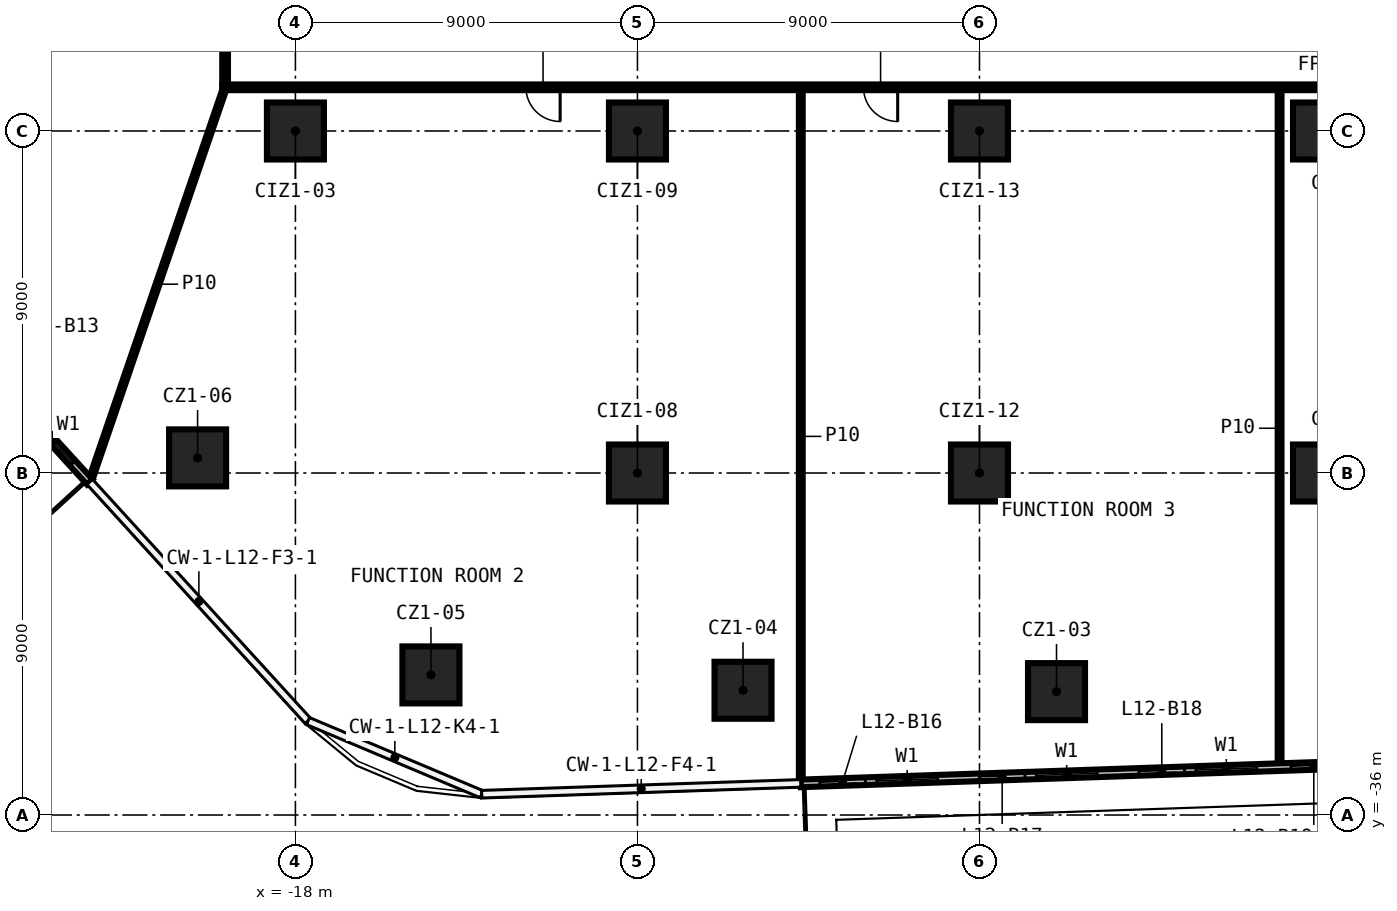
"""IFC4 building model, lengths in metres.
Left out: names, types, materials, properties, quantities, classifications, styles, units other than length and angle.
Written with IfcOpenShell. Run it as: python <this file> out.ifc"""

import sys

from ifc_helpers import new_model, si_unit, direction, frame, frame_2d, origin, origin_2d, place, context, subcontext, project, spatial, rectangle, extrude, element, fill, save


model = new_model("IFC4")
c1 = context("Model", 3, precision=1e-05, world=origin(), true_north=direction((0.0, 1.0)))
c2 = subcontext(c1, "Body", "Model", "MODEL_VIEW")
j1 = project(units=[si_unit("LENGTHUNIT", "METRE"), si_unit("PLANEANGLEUNIT", "RADIAN")], contexts=[c1])
p1 = place(None, origin())
s1 = spatial("IfcSite", under=j1, at=p1, CompositionType="ELEMENT")
p2 = place(p1, origin())
s2 = spatial("IfcBuilding", under=s1, at=p2, CompositionType="ELEMENT")
p3 = place(p2, frame((0.0, 0.0, 66.2)))
s3 = spatial("IfcBuildingStorey", under=s2, at=p3, CompositionType="ELEMENT", Elevation=66.2)
for number, where, z_axis, x_axis in (
    (1, (2.027, -32.753, 0.0), (0.0, 0.0, 1.0), (1.0, 0.0, 0.0)),
    (2, (-6.222, -32.717, 0.0), (0.0, 0.0, 1.0), (1.0, 0.0, 0.0)),
    (3, (-14.434, -32.313, 0.0), (0.0, 0.0, 1.0), (1.0, 0.0, 0.0)),
    (4, (-20.574, -26.602, 0.0), (0.0, 0.0, 1.0), (1.0, 0.0, 0.0)),
    (5, (-18.0, -18.0, 0.0), (0.0, 0.0, 1.0), (1.0, 0.0, 0.0)),
    (6, (-9.0, -27.0, 0.0), (0.0, 0.0, 1.0), (1.0, 0.0, 0.0)),
    (7, (-9.0, -18.0, 0.0), (0.0, 0.0, 1.0), (1.0, 0.0, 0.0)),
    (8, (0.0, -27.0, 0.0), (0.0, 0.0, 1.0), (1.0, 0.0, 0.0)),
    (9, (0.0, -18.0, 0.0), (0.0, 0.0, 1.0), (1.0, 0.0, 0.0)),
    (10, (9.0, -27.0, 0.0), (0.0, 0.0, 1.0), (1.0, 0.0, 0.0)),
    (11, (9.0, -18.0, 0.0), (0.0, 0.0, 1.0), (1.0, 0.0, 0.0)),
):
    element("IfcColumn", number, at=place(p3, frame(where, z_axis=z_axis, x_axis=x_axis)), inside=s3, PredefinedType="COLUMN", context=c2, shape_type="SweptSolid", body=[
        extrude(rectangle(XDim=1.5, YDim=1.5, at=origin_2d()), origin(), (0.0, 0.0, 1.0), 3.3),
    ])
p4 = place(p3, frame((19.925, -16.85, 0.0), z_axis=(0.0, 0.0, 1.0), x_axis=(-1.0, 0.0, 0.0)))
e12 = element("IfcWall", 12, at=p4, inside=s3, PredefinedType="PARTITIONING", context=c2, shape_type="SweptSolid", body=[
    extrude(rectangle(XDim=39.85, YDim=0.15, at=frame_2d((19.925, 0.0))), origin(), (0.0, 0.0, 1.0), 3.3),
])
p5 = place(p4, frame((30.959, 0.0, 0.0)))
e13 = element("IfcOpeningElement", 13, at=p5, cuts=e12, PredefinedType="OPENING", context=c2, shape_type="SweptSolid", body=[
    extrude(rectangle(XDim=0.9, YDim=2.1, at=frame_2d((0.45, 1.05))), frame((0.0, 0.085, 0.0), z_axis=(0.0, -1.0, 0.0), x_axis=(1.0, 0.0, 0.0)), (0.0, 0.0, 1.0), 0.17),
])
p6 = place(p4, frame((22.077, 0.0, 0.0)))
e14 = element("IfcOpeningElement", 14, at=p6, cuts=e12, PredefinedType="OPENING", context=c2, shape_type="SweptSolid", body=[
    extrude(rectangle(XDim=0.9, YDim=2.1, at=frame_2d((0.45, 1.05))), frame((0.0, 0.085, 0.0), z_axis=(0.0, -1.0, 0.0), x_axis=(1.0, 0.0, 0.0)), (0.0, 0.0, 1.0), 0.17),
])
p7 = place(p3, frame((-23.404, -27.213, 0.0), z_axis=(0.0, 0.0, 1.0), x_axis=(0.32441263541, 0.945915663253, 0.0)))
e15 = element("IfcWall", 15, at=p7, inside=s3, PredefinedType="PARTITIONING", context=c2, shape_type="SweptSolid", body=[
    extrude(rectangle(XDim=10.955, YDim=0.1, at=frame_2d((5.478, 0.0))), origin(), (0.0, 0.0, 1.0), 3.3),
])
p8 = place(p3, frame((7.897, -34.72, 0.0), z_axis=(0.0, 0.0, 1.0), x_axis=(0.0, 1.0, 0.0)))
e16 = element("IfcWall", 16, at=p8, inside=s3, PredefinedType="PARTITIONING", context=c2, shape_type="SweptSolid", body=[
    extrude(rectangle(XDim=17.795, YDim=0.1, at=frame_2d((8.897, 0.0))), origin(), (0.0, 0.0, 1.0), 3.3),
])
p9 = place(p3, frame((-4.702, -35.148, 0.0), z_axis=(0.0, 0.0, 1.0), x_axis=(0.0, 1.0, 0.0)))
e17 = element("IfcWall", 17, at=p9, inside=s3, PredefinedType="PARTITIONING", context=c2, shape_type="SweptSolid", body=[
    extrude(rectangle(XDim=18.223, YDim=0.1, at=frame_2d((9.111, 0.0))), origin(), (0.0, 0.0, 1.0), 3.3),
])
p10 = place(p3, frame((-19.85, -16.775, 0.0), z_axis=(0.0, 0.0, 1.0), x_axis=(0.0, 1.0, 0.0)))
e18 = element("IfcWall", 18, at=p10, inside=s3, PredefinedType="PARTITIONING", context=c2, shape_type="SweptSolid", body=[
    extrude(rectangle(XDim=33.55, YDim=0.15, at=frame_2d((16.775, 0.0))), origin(), (0.0, 0.0, 1.0), 3.3),
])
p11 = place(p10, frame((10.123, 0.0, 0.0)))
e19 = element("IfcOpeningElement", 19, at=p11, cuts=e18, PredefinedType="OPENING", context=c2, shape_type="SweptSolid", body=[
    extrude(rectangle(XDim=1.0, YDim=2.1, at=frame_2d((0.5, 1.05))), frame((0.0, 0.085, 0.0), z_axis=(0.0, -1.0, 0.0), x_axis=(1.0, 0.0, 0.0)), (0.0, 0.0, 1.0), 0.17),
])
p12 = place(p10, frame((4.179, 0.0, 0.0)))
e20 = element("IfcOpeningElement", 20, at=p12, cuts=e18, PredefinedType="OPENING", context=c2, shape_type="SweptSolid", body=[
    extrude(rectangle(XDim=0.9, YDim=2.1, at=frame_2d((0.45, 1.05))), frame((0.0, 0.085, 0.0), z_axis=(0.0, -1.0, 0.0), x_axis=(1.0, 0.0, 0.0)), (0.0, 0.0, 1.0), 0.17),
])
p13 = place(p10, frame((27.651, 0.0, 0.0)))
e21 = element("IfcOpeningElement", 21, at=p13, cuts=e18, PredefinedType="OPENING", context=c2, shape_type="SweptSolid", body=[
    extrude(rectangle(XDim=1.0, YDim=2.1, at=frame_2d((0.5, 1.05))), frame((0.0, 0.085, 0.0), z_axis=(0.0, -1.0, 0.0), x_axis=(1.0, 0.0, 0.0)), (0.0, 0.0, 1.0), 0.17),
])
p14 = place(p10, frame((20.601, 0.0, 0.0)))
e22 = element("IfcOpeningElement", 22, at=p14, cuts=e18, PredefinedType="OPENING", context=c2, shape_type="SweptSolid", body=[
    extrude(rectangle(XDim=1.0, YDim=2.1, at=frame_2d((0.5, 1.05))), frame((0.0, 0.085, 0.0), z_axis=(0.0, -1.0, 0.0), x_axis=(1.0, 0.0, 0.0)), (0.0, 0.0, 1.0), 0.17),
])
p15 = place(p3, frame((-34.906, -14.636, 0.0), z_axis=(0.0, 0.0, 1.0), x_axis=(0.674011334321, -0.738721003632, 0.0)))
e23 = element("IfcWall", 23, at=p15, inside=s3, PredefinedType="SOLIDWALL", context=c2, shape_type="SweptSolid", body=[
    extrude(rectangle(XDim=17.053, YDim=0.2, at=frame_2d((8.527, 0.0))), origin(), (0.0, 0.0, 1.0), 3.3),
])
p16 = place(p15, frame((0.5, 0.0, 0.6)))
e24 = element("IfcOpeningElement", 24, at=p16, cuts=e23, PredefinedType="OPENING", context=c2, shape_type="SweptSolid", body=[
    extrude(rectangle(XDim=1.6, YDim=2.4, at=frame_2d((0.8, 1.2))), frame((0.0, 0.11, 0.0), z_axis=(0.0, -1.0, 0.0), x_axis=(1.0, 0.0, 0.0)), (0.0, 0.0, 1.0), 0.22),
])
p17 = place(p15, frame((2.4, 0.0, 0.0)))
e25 = element("IfcOpeningElement", 25, at=p17, cuts=e23, PredefinedType="OPENING", context=c2, shape_type="SweptSolid", body=[
    extrude(rectangle(XDim=1.2, YDim=2.4, at=frame_2d((0.6, 1.2))), frame((0.0, 0.11, 0.0), z_axis=(0.0, -1.0, 0.0), x_axis=(1.0, 0.0, 0.0)), (0.0, 0.0, 1.0), 0.22),
])
p18 = place(p15, frame((6.263, 0.0, 0.6)))
e26 = element("IfcOpeningElement", 26, at=p18, cuts=e23, PredefinedType="OPENING", context=c2, shape_type="SweptSolid", body=[
    extrude(rectangle(XDim=1.6, YDim=2.4, at=frame_2d((0.8, 1.2))), frame((0.0, 0.11, 0.0), z_axis=(0.0, -1.0, 0.0), x_axis=(1.0, 0.0, 0.0)), (0.0, 0.0, 1.0), 0.22),
])
p19 = place(p15, frame((4.763, 0.0, 0.0)))
e27 = element("IfcOpeningElement", 27, at=p19, cuts=e23, PredefinedType="OPENING", context=c2, shape_type="SweptSolid", body=[
    extrude(rectangle(XDim=1.2, YDim=2.4, at=frame_2d((0.6, 1.2))), frame((0.0, 0.11, 0.0), z_axis=(0.0, -1.0, 0.0), x_axis=(1.0, 0.0, 0.0)), (0.0, 0.0, 1.0), 0.22),
])
p20 = place(p15, frame((9.027, 0.0, 0.6)))
e28 = element("IfcOpeningElement", 28, at=p20, cuts=e23, PredefinedType="OPENING", context=c2, shape_type="SweptSolid", body=[
    extrude(rectangle(XDim=1.6, YDim=2.4, at=frame_2d((0.8, 1.2))), frame((0.0, 0.11, 0.0), z_axis=(0.0, -1.0, 0.0), x_axis=(1.0, 0.0, 0.0)), (0.0, 0.0, 1.0), 0.22),
])
p21 = place(p15, frame((10.927, 0.0, 0.0)))
e29 = element("IfcOpeningElement", 29, at=p21, cuts=e23, PredefinedType="OPENING", context=c2, shape_type="SweptSolid", body=[
    extrude(rectangle(XDim=1.2, YDim=2.4, at=frame_2d((0.6, 1.2))), frame((0.0, 0.11, 0.0), z_axis=(0.0, -1.0, 0.0), x_axis=(1.0, 0.0, 0.0)), (0.0, 0.0, 1.0), 0.22),
])
p22 = place(p15, frame((14.79, 0.0, 0.6)))
e30 = element("IfcOpeningElement", 30, at=p22, cuts=e23, PredefinedType="OPENING", context=c2, shape_type="SweptSolid", body=[
    extrude(rectangle(XDim=1.6, YDim=2.4, at=frame_2d((0.8, 1.2))), frame((0.0, 0.11, 0.0), z_axis=(0.0, -1.0, 0.0), x_axis=(1.0, 0.0, 0.0)), (0.0, 0.0, 1.0), 0.22),
])
p23 = place(p15, frame((13.29, 0.0, 0.0)))
e31 = element("IfcOpeningElement", 31, at=p23, cuts=e23, PredefinedType="OPENING", context=c2, shape_type="SweptSolid", body=[
    extrude(rectangle(XDim=1.2, YDim=2.4, at=frame_2d((0.6, 1.2))), frame((0.0, 0.11, 0.0), z_axis=(0.0, -1.0, 0.0), x_axis=(1.0, 0.0, 0.0)), (0.0, 0.0, 1.0), 0.22),
])
p24 = place(p3, frame((-4.702, -35.168, 0.0), z_axis=(0.0, 0.0, 1.0), x_axis=(0.999424265527, 0.033928416948, 0.0)))
e32 = element("IfcWall", 32, at=p24, inside=s3, PredefinedType="SOLIDWALL", context=c2, shape_type="SweptSolid", body=[
    extrude(rectangle(XDim=21.012, YDim=0.2, at=frame_2d((10.506, 0.0))), origin(), (0.0, 0.0, 1.0), 3.3),
])
p25 = place(p24, frame((2.0, 0.0, 0.6)))
e33 = element("IfcOpeningElement", 33, at=p25, cuts=e32, PredefinedType="OPENING", context=c2, shape_type="SweptSolid", body=[
    extrude(rectangle(XDim=1.6, YDim=2.4, at=frame_2d((0.8, 1.2))), frame((0.0, 0.11, 0.0), z_axis=(0.0, -1.0, 0.0), x_axis=(1.0, 0.0, 0.0)), (0.0, 0.0, 1.0), 0.22),
])
p26 = place(p24, frame((0.5, 0.0, 0.0)))
e34 = element("IfcOpeningElement", 34, at=p26, cuts=e32, PredefinedType="OPENING", context=c2, shape_type="SweptSolid", body=[
    extrude(rectangle(XDim=1.2, YDim=2.4, at=frame_2d((0.6, 1.2))), frame((0.0, 0.11, 0.0), z_axis=(0.0, -1.0, 0.0), x_axis=(1.0, 0.0, 0.0)), (0.0, 0.0, 1.0), 0.22),
])
p27 = place(p24, frame((6.202, 0.0, 0.6)))
e35 = element("IfcOpeningElement", 35, at=p27, cuts=e32, PredefinedType="OPENING", context=c2, shape_type="SweptSolid", body=[
    extrude(rectangle(XDim=1.6, YDim=2.4, at=frame_2d((0.8, 1.2))), frame((0.0, 0.11, 0.0), z_axis=(0.0, -1.0, 0.0), x_axis=(1.0, 0.0, 0.0)), (0.0, 0.0, 1.0), 0.22),
])
p28 = place(p24, frame((4.702, 0.0, 0.0)))
e36 = element("IfcOpeningElement", 36, at=p28, cuts=e32, PredefinedType="OPENING", context=c2, shape_type="SweptSolid", body=[
    extrude(rectangle(XDim=1.2, YDim=2.4, at=frame_2d((0.6, 1.2))), frame((0.0, 0.11, 0.0), z_axis=(0.0, -1.0, 0.0), x_axis=(1.0, 0.0, 0.0)), (0.0, 0.0, 1.0), 0.22),
])
p29 = place(p24, frame((10.405, 0.0, 0.6)))
e37 = element("IfcOpeningElement", 37, at=p29, cuts=e32, PredefinedType="OPENING", context=c2, shape_type="SweptSolid", body=[
    extrude(rectangle(XDim=1.6, YDim=2.4, at=frame_2d((0.8, 1.2))), frame((0.0, 0.11, 0.0), z_axis=(0.0, -1.0, 0.0), x_axis=(1.0, 0.0, 0.0)), (0.0, 0.0, 1.0), 0.22),
])
p30 = place(p24, frame((8.905, 0.0, 0.0)))
e38 = element("IfcOpeningElement", 38, at=p30, cuts=e32, PredefinedType="OPENING", context=c2, shape_type="SweptSolid", body=[
    extrude(rectangle(XDim=1.2, YDim=2.4, at=frame_2d((0.6, 1.2))), frame((0.0, 0.11, 0.0), z_axis=(0.0, -1.0, 0.0), x_axis=(1.0, 0.0, 0.0)), (0.0, 0.0, 1.0), 0.22),
])
p31 = place(p24, frame((14.607, 0.0, 0.6)))
e39 = element("IfcOpeningElement", 39, at=p31, cuts=e32, PredefinedType="OPENING", context=c2, shape_type="SweptSolid", body=[
    extrude(rectangle(XDim=1.6, YDim=2.4, at=frame_2d((0.8, 1.2))), frame((0.0, 0.11, 0.0), z_axis=(0.0, -1.0, 0.0), x_axis=(1.0, 0.0, 0.0)), (0.0, 0.0, 1.0), 0.22),
])
p32 = place(p24, frame((12.907, 0.0, 0.0)))
e40 = element("IfcOpeningElement", 40, at=p32, cuts=e32, PredefinedType="OPENING", context=c2, shape_type="SweptSolid", body=[
    extrude(rectangle(XDim=1.2, YDim=2.4, at=frame_2d((0.6, 1.2))), frame((0.0, 0.11, 0.0), z_axis=(0.0, -1.0, 0.0), x_axis=(1.0, 0.0, 0.0)), (0.0, 0.0, 1.0), 0.22),
])
p33 = place(p24, frame((18.809, 0.0, 0.6)))
e41 = element("IfcOpeningElement", 41, at=p33, cuts=e32, PredefinedType="OPENING", context=c2, shape_type="SweptSolid", body=[
    extrude(rectangle(XDim=1.6, YDim=2.4, at=frame_2d((0.8, 1.2))), frame((0.0, 0.11, 0.0), z_axis=(0.0, -1.0, 0.0), x_axis=(1.0, 0.0, 0.0)), (0.0, 0.0, 1.0), 0.22),
])
p34 = place(p24, frame((17.309, 0.0, 0.0)))
e42 = element("IfcOpeningElement", 42, at=p34, cuts=e32, PredefinedType="OPENING", context=c2, shape_type="SweptSolid", body=[
    extrude(rectangle(XDim=1.2, YDim=2.4, at=frame_2d((0.6, 1.2))), frame((0.0, 0.11, 0.0), z_axis=(0.0, -1.0, 0.0), x_axis=(1.0, 0.0, 0.0)), (0.0, 0.0, 1.0), 0.22),
])
p35 = place(p5, origin())
e43 = element("IfcDoor", 43, at=p35, inside=s3, OperationType="SINGLE_SWING_RIGHT", PredefinedType="DOOR", context=c2, shape_type="SweptSolid", body=[
    extrude(rectangle(XDim=0.9, YDim=2.1, at=frame_2d((0.45, 1.05))), frame((0.0, 0.025, 0.0), z_axis=(0.0, -1.0, 0.0), x_axis=(1.0, 0.0, 0.0)), (0.0, 0.0, 1.0), 0.05),
])
fill(e13, e43)
p36 = place(p6, origin())
e44 = element("IfcDoor", 44, at=p36, inside=s3, OperationType="SINGLE_SWING_LEFT", PredefinedType="DOOR", context=c2, shape_type="SweptSolid", body=[
    extrude(rectangle(XDim=0.9, YDim=2.1, at=frame_2d((0.45, 1.05))), frame((0.0, 0.025, 0.0), z_axis=(0.0, -1.0, 0.0), x_axis=(1.0, 0.0, 0.0)), (0.0, 0.0, 1.0), 0.05),
])
fill(e14, e44)
p37 = place(p22, origin())
e45 = element("IfcWindow", 45, at=p37, inside=s3, PartitioningType="SINGLE_PANEL", PredefinedType="WINDOW", context=c2, shape_type="SweptSolid", body=[
    extrude(rectangle(XDim=1.6, YDim=2.4, at=frame_2d((0.8, 1.2))), frame((0.0, 0.03, 0.0), z_axis=(0.0, -1.0, 0.0), x_axis=(1.0, 0.0, 0.0)), (0.0, 0.0, 1.0), 0.06),
])
fill(e30, e45)
p38 = place(p25, origin())
e46 = element("IfcWindow", 46, at=p38, inside=s3, PartitioningType="SINGLE_PANEL", PredefinedType="WINDOW", context=c2, shape_type="SweptSolid", body=[
    extrude(rectangle(XDim=1.6, YDim=2.4, at=frame_2d((0.8, 1.2))), frame((0.0, 0.03, 0.0), z_axis=(0.0, -1.0, 0.0), x_axis=(1.0, 0.0, 0.0)), (0.0, 0.0, 1.0), 0.06),
])
fill(e33, e46)
p39 = place(p26, origin())
e47 = element("IfcDoor", 47, at=p39, inside=s3, OperationType="SLIDING_TO_LEFT", PredefinedType="DOOR", context=c2, shape_type="SweptSolid", body=[
    extrude(rectangle(XDim=1.2, YDim=2.4, at=frame_2d((0.6, 1.2))), frame((0.0, 0.025, 0.0), z_axis=(0.0, -1.0, 0.0), x_axis=(1.0, 0.0, 0.0)), (0.0, 0.0, 1.0), 0.05),
])
fill(e34, e47)
p40 = place(p27, origin())
e48 = element("IfcWindow", 48, at=p40, inside=s3, PartitioningType="SINGLE_PANEL", PredefinedType="WINDOW", context=c2, shape_type="SweptSolid", body=[
    extrude(rectangle(XDim=1.6, YDim=2.4, at=frame_2d((0.8, 1.2))), frame((0.0, 0.03, 0.0), z_axis=(0.0, -1.0, 0.0), x_axis=(1.0, 0.0, 0.0)), (0.0, 0.0, 1.0), 0.06),
])
fill(e35, e48)
p41 = place(p28, origin())
e49 = element("IfcDoor", 49, at=p41, inside=s3, OperationType="SLIDING_TO_LEFT", PredefinedType="DOOR", context=c2, shape_type="SweptSolid", body=[
    extrude(rectangle(XDim=1.2, YDim=2.4, at=frame_2d((0.6, 1.2))), frame((0.0, 0.025, 0.0), z_axis=(0.0, -1.0, 0.0), x_axis=(1.0, 0.0, 0.0)), (0.0, 0.0, 1.0), 0.05),
])
fill(e36, e49)
p42 = place(p29, origin())
e50 = element("IfcWindow", 50, at=p42, inside=s3, PartitioningType="SINGLE_PANEL", PredefinedType="WINDOW", context=c2, shape_type="SweptSolid", body=[
    extrude(rectangle(XDim=1.6, YDim=2.4, at=frame_2d((0.8, 1.2))), frame((0.0, 0.03, 0.0), z_axis=(0.0, -1.0, 0.0), x_axis=(1.0, 0.0, 0.0)), (0.0, 0.0, 1.0), 0.06),
])
fill(e37, e50)
p43 = place(p30, origin())
e51 = element("IfcDoor", 51, at=p43, inside=s3, OperationType="SLIDING_TO_LEFT", PredefinedType="DOOR", context=c2, shape_type="SweptSolid", body=[
    extrude(rectangle(XDim=1.2, YDim=2.4, at=frame_2d((0.6, 1.2))), frame((0.0, 0.025, 0.0), z_axis=(0.0, -1.0, 0.0), x_axis=(1.0, 0.0, 0.0)), (0.0, 0.0, 1.0), 0.05),
])
fill(e38, e51)
p44 = place(p32, origin())
e52 = element("IfcDoor", 52, at=p44, inside=s3, OperationType="SLIDING_TO_LEFT", PredefinedType="DOOR", context=c2, shape_type="SweptSolid", body=[
    extrude(rectangle(XDim=1.2, YDim=2.4, at=frame_2d((0.6, 1.2))), frame((0.0, 0.025, 0.0), z_axis=(0.0, -1.0, 0.0), x_axis=(1.0, 0.0, 0.0)), (0.0, 0.0, 1.0), 0.05),
])
fill(e40, e52)
save(model, sys.argv[1])
